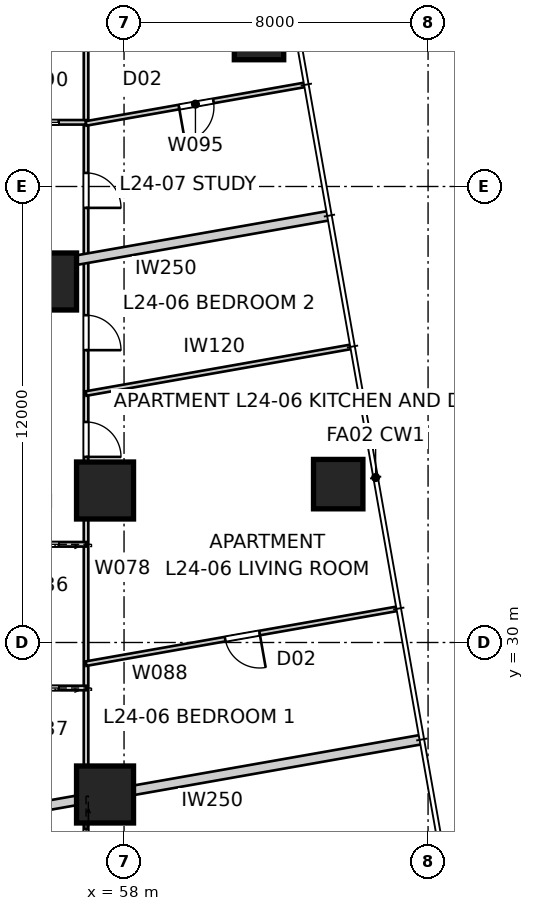
"""IFC4 building model, lengths in metres.
Left out: names, types, materials, properties, quantities, classifications, styles, units other than length and angle.
Written with IfcOpenShell. Run it as: python <this file> out.ifc"""

import sys

from ifc_helpers import new_model, si_unit, direction, frame, frame_2d, origin, origin_2d, place, context, subcontext, project, spatial, rectangle, extrude, element, fill, save


model = new_model("IFC4")
c1 = context("Model", 3, precision=1e-05, world=origin(), true_north=direction((0.0, 1.0)))
c2 = subcontext(c1, "Body", "Model", "MODEL_VIEW")
j1 = project(units=[si_unit("LENGTHUNIT", "METRE"), si_unit("PLANEANGLEUNIT", "RADIAN")], contexts=[c1])
p1 = place(None, origin())
s1 = spatial("IfcSite", under=j1, at=p1, CompositionType="ELEMENT")
p2 = place(p1, origin())
s2 = spatial("IfcBuilding", under=s1, at=p2, CompositionType="ELEMENT")
p3 = place(p2, frame((0.0, 0.0, 89.6)))
s3 = spatial("IfcBuildingStorey", under=s2, at=p3, CompositionType="ELEMENT", Elevation=89.6)
for number, where, z_axis, x_axis in (
    (1, (63.635, 34.167, 0.0), (0.0, 0.0, 1.0), (1.0, 0.0, 0.0)),
    (2, (61.552, 45.985, 0.0), (0.0, 0.0, 1.0), (1.0, 0.0, 0.0)),
):
    element("IfcColumn", number, at=place(p3, frame(where, z_axis=z_axis, x_axis=x_axis)), inside=s3, PredefinedType="COLUMN", context=c2, shape_type="SweptSolid", body=[
        extrude(rectangle(XDim=1.3, YDim=1.3, at=origin_2d()), origin(), (0.0, 0.0, 1.0), 3.4),
    ])
for number, where, z_axis, x_axis in (
    (3, (57.5, 26.0, 0.0), (0.0, 0.0, 1.0), (1.0, 0.0, 0.0)),
    (4, (57.5, 34.0, 0.0), (0.0, 0.0, 1.0), (1.0, 0.0, 0.0)),
    (5, (56.0, 39.5, 0.0), (0.0, 0.0, 1.0), (1.0, 0.0, 0.0)),
):
    element("IfcColumn", number, at=place(p3, frame(where, z_axis=z_axis, x_axis=x_axis)), inside=s3, PredefinedType="COLUMN", context=c2, shape_type="SweptSolid", body=[
        extrude(rectangle(XDim=1.5, YDim=1.5, at=origin_2d()), origin(), (0.0, 0.0, 1.0), 3.4),
    ])
p4 = place(p3, frame((63.405, 41.235, 0.0), z_axis=(0.0, 0.0, 1.0), x_axis=(-0.984806596137, -0.173654738504, 0.0)))
e6 = element("IfcWall", 6, at=p4, inside=s3, PredefinedType="PARTITIONING", context=c2, shape_type="SweptSolid", body=[
    extrude(rectangle(XDim=8.958, YDim=0.25, at=frame_2d((4.479, 0.0))), origin(), (0.0, 0.0, 1.0), 3.25),
])
p5 = place(p3, frame((65.836, 27.448, 0.0), z_axis=(0.0, 0.0, 1.0), x_axis=(-0.98481000304, -0.173635416642, 0.0)))
e7 = element("IfcWall", 7, at=p5, inside=s3, PredefinedType="PARTITIONING", context=c2, shape_type="SweptSolid", body=[
    extrude(rectangle(XDim=11.427, YDim=0.25, at=frame_2d((5.713, 0.0))), origin(), (0.0, 0.0, 1.0), 3.25),
])
p6 = place(p3, frame((57.0, 46.2, 0.0), z_axis=(0.0, 0.0, 1.0), x_axis=(0.0, -1.0, 0.0)))
e8 = element("IfcWall", 8, at=p6, inside=s3, PredefinedType="PARTITIONING", context=c2, shape_type="SweptSolid", body=[
    extrude(rectangle(XDim=32.4, YDim=0.12, at=frame_2d((16.2, 0.0))), origin(), (0.0, 0.0, 1.0), 2.55),
])
p7 = place(p6, frame((10.396, 0.0, 0.0)))
e9 = element("IfcOpeningElement", 9, at=p7, cuts=e8, PredefinedType="OPENING", context=c2, shape_type="SweptSolid", body=[
    extrude(rectangle(XDim=0.92, YDim=2.34, at=frame_2d((0.46, 1.17))), frame((0.0, 0.07, 0.0), z_axis=(0.0, -1.0, 0.0), x_axis=(1.0, 0.0, 0.0)), (0.0, 0.0, 1.0), 0.14),
])
p8 = place(p6, frame((7.587, 0.0, 0.0)))
e10 = element("IfcOpeningElement", 10, at=p8, cuts=e8, PredefinedType="OPENING", context=c2, shape_type="SweptSolid", body=[
    extrude(rectangle(XDim=0.92, YDim=2.34, at=frame_2d((0.46, 1.17))), frame((0.0, 0.07, 0.0), z_axis=(0.0, -1.0, 0.0), x_axis=(1.0, 0.0, 0.0)), (0.0, 0.0, 1.0), 0.14),
])
p9 = place(p6, frame((3.843, 0.0, 0.0)))
e11 = element("IfcOpeningElement", 11, at=p9, cuts=e8, PredefinedType="OPENING", context=c2, shape_type="SweptSolid", body=[
    extrude(rectangle(XDim=0.92, YDim=2.34, at=frame_2d((0.46, 1.17))), frame((0.0, 0.07, 0.0), z_axis=(0.0, -1.0, 0.0), x_axis=(1.0, 0.0, 0.0)), (0.0, 0.0, 1.0), 0.14),
])
p10 = place(p6, frame((27.988, 0.0, 0.0)))
e12 = element("IfcOpeningElement", 12, at=p10, cuts=e8, PredefinedType="OPENING", context=c2, shape_type="SweptSolid", body=[
    extrude(rectangle(XDim=0.92, YDim=2.34, at=frame_2d((0.46, 1.17))), frame((0.0, 0.07, 0.0), z_axis=(0.0, -1.0, 0.0), x_axis=(1.0, 0.0, 0.0)), (0.0, 0.0, 1.0), 0.14),
])
p11 = place(p6, frame((23.957, 0.0, 0.0)))
e13 = element("IfcOpeningElement", 13, at=p11, cuts=e8, PredefinedType="OPENING", context=c2, shape_type="SweptSolid", body=[
    extrude(rectangle(XDim=0.96, YDim=2.1, at=frame_2d((0.48, 1.05))), frame((0.0, 0.07, 0.0), z_axis=(0.0, -1.0, 0.0), x_axis=(1.0, 0.0, 0.0)), (0.0, 0.0, 1.0), 0.14),
])
p12 = place(p6, frame((21.108, 0.0, 0.0)))
e14 = element("IfcOpeningElement", 14, at=p12, cuts=e8, PredefinedType="OPENING", context=c2, shape_type="SweptSolid", body=[
    extrude(rectangle(XDim=0.96, YDim=2.1, at=frame_2d((0.48, 1.05))), frame((0.0, 0.07, 0.0), z_axis=(0.0, -1.0, 0.0), x_axis=(1.0, 0.0, 0.0)), (0.0, 0.0, 1.0), 0.14),
])
p13 = place(p3, frame((57.0, 32.585, 0.0), z_axis=(0.0, 0.0, 1.0), x_axis=(-1.0, 0.0, 0.0)))
e15 = element("IfcWall", 15, at=p13, inside=s3, PredefinedType="PARTITIONING", context=c2, shape_type="SweptSolid", body=[
    extrude(rectangle(XDim=2.4, YDim=0.12, at=frame_2d((1.2, 0.0))), origin(), (0.0, 0.0, 1.0), 3.25),
])
p14 = place(p13, frame((0.72, 0.0, 0.0)))
e16 = element("IfcOpeningElement", 16, at=p14, cuts=e15, PredefinedType="OPENING", context=c2, shape_type="SweptSolid", body=[
    extrude(rectangle(XDim=0.96, YDim=2.1, at=frame_2d((0.48, 1.05))), frame((0.0, 0.07, 0.0), z_axis=(0.0, -1.0, 0.0), x_axis=(1.0, 0.0, 0.0)), (0.0, 0.0, 1.0), 0.14),
])
p15 = place(p3, frame((57.0, 28.802, 0.0), z_axis=(0.0, 0.0, 1.0), x_axis=(-1.0, 0.0, 0.0)))
e17 = element("IfcWall", 17, at=p15, inside=s3, PredefinedType="PARTITIONING", context=c2, shape_type="SweptSolid", body=[
    extrude(rectangle(XDim=2.4, YDim=0.12, at=frame_2d((1.2, 0.0))), origin(), (0.0, 0.0, 1.0), 3.25),
])
p16 = place(p15, frame((0.72, 0.0, 0.0)))
e18 = element("IfcOpeningElement", 18, at=p16, cuts=e17, PredefinedType="OPENING", context=c2, shape_type="SweptSolid", body=[
    extrude(rectangle(XDim=0.96, YDim=2.1, at=frame_2d((0.48, 1.05))), frame((0.0, 0.07, 0.0), z_axis=(0.0, -1.0, 0.0), x_axis=(1.0, 0.0, 0.0)), (0.0, 0.0, 1.0), 0.14),
])
p17 = place(p3, frame((65.188, 30.887, 0.0), z_axis=(0.0, 0.0, 1.0), x_axis=(-0.984807787824, -0.173647980238, 0.0)))
e19 = element("IfcWall", 19, at=p17, inside=s3, PredefinedType="PARTITIONING", context=c2, shape_type="SweptSolid", body=[
    extrude(rectangle(XDim=8.315, YDim=0.12, at=frame_2d((4.157, 0.0))), origin(), (0.0, 0.0, 1.0), 3.25),
])
p18 = place(p17, frame((3.677, 0.0, 0.0)))
e20 = element("IfcOpeningElement", 20, at=p18, cuts=e19, PredefinedType="OPENING", context=c2, shape_type="SweptSolid", body=[
    extrude(rectangle(XDim=0.92, YDim=2.34, at=frame_2d((0.46, 1.17))), frame((0.0, 0.07, 0.0), z_axis=(0.0, -1.0, 0.0), x_axis=(1.0, 0.0, 0.0)), (0.0, 0.0, 1.0), 0.14),
])
p19 = place(p3, frame((57.0, 36.552, 0.0), z_axis=(0.0, 0.0, 1.0), x_axis=(0.984809234282, 0.173639776761, 0.0)))
e21 = element("IfcWall", 21, at=p19, inside=s3, PredefinedType="PARTITIONING", context=c2, shape_type="SweptSolid", body=[
    extrude(rectangle(XDim=7.081, YDim=0.12, at=frame_2d((3.541, 0.0))), origin(), (0.0, 0.0, 1.0), 3.25),
])
p20 = place(p3, frame((54.6, 43.689, 0.0), z_axis=(0.0, 0.0, 1.0), x_axis=(1.0, 0.0, 0.0)))
e22 = element("IfcWall", 22, at=p20, inside=s3, PredefinedType="PARTITIONING", context=c2, shape_type="SweptSolid", body=[
    extrude(rectangle(XDim=2.4, YDim=0.12, at=frame_2d((1.2, 0.0))), origin(), (0.0, 0.0, 1.0), 3.25),
])
p21 = place(p20, frame((0.72, 0.0, 0.0)))
e23 = element("IfcOpeningElement", 23, at=p21, cuts=e22, PredefinedType="OPENING", context=c2, shape_type="SweptSolid", body=[
    extrude(rectangle(XDim=0.96, YDim=2.1, at=frame_2d((0.48, 1.05))), frame((0.0, 0.07, 0.0), z_axis=(0.0, -1.0, 0.0), x_axis=(1.0, 0.0, 0.0)), (0.0, 0.0, 1.0), 0.14),
])
p22 = place(p3, frame((62.758, 44.675, 0.0), z_axis=(0.0, 0.0, 1.0), x_axis=(-0.984810032319, -0.173635250578, 0.0)))
e24 = element("IfcWall", 24, at=p22, inside=s3, PredefinedType="PARTITIONING", context=c2, shape_type="SweptSolid", body=[
    extrude(rectangle(XDim=5.846, YDim=0.12, at=frame_2d((2.923, 0.0))), origin(), (0.0, 0.0, 1.0), 3.25),
])
p23 = place(p22, frame((2.443, 0.0, 0.0)))
e25 = element("IfcOpeningElement", 25, at=p23, cuts=e24, PredefinedType="OPENING", context=c2, shape_type="SweptSolid", body=[
    extrude(rectangle(XDim=0.92, YDim=2.34, at=frame_2d((0.46, 1.17))), frame((0.0, 0.07, 0.0), z_axis=(0.0, -1.0, 0.0), x_axis=(1.0, 0.0, 0.0)), (0.0, 0.0, 1.0), 0.14),
])
p24 = place(p7, origin())
e26 = element("IfcDoor", 26, at=p24, inside=s3, OperationType="SINGLE_SWING_RIGHT", PredefinedType="DOOR", context=c2, shape_type="SweptSolid", body=[
    extrude(rectangle(XDim=0.92, YDim=2.34, at=frame_2d((0.46, 1.17))), frame((0.0, 0.025, 0.0), z_axis=(0.0, -1.0, 0.0), x_axis=(1.0, 0.0, 0.0)), (0.0, 0.0, 1.0), 0.05),
])
fill(e9, e26)
p25 = place(p8, origin())
e27 = element("IfcDoor", 27, at=p25, inside=s3, OperationType="SINGLE_SWING_RIGHT", PredefinedType="DOOR", context=c2, shape_type="SweptSolid", body=[
    extrude(rectangle(XDim=0.92, YDim=2.34, at=frame_2d((0.46, 1.17))), frame((0.0, 0.025, 0.0), z_axis=(0.0, -1.0, 0.0), x_axis=(1.0, 0.0, 0.0)), (0.0, 0.0, 1.0), 0.05),
])
fill(e10, e27)
p26 = place(p14, origin())
e28 = element("IfcDoor", 28, at=p26, inside=s3, OperationType="SLIDING_TO_LEFT", PredefinedType="DOOR", context=c2, shape_type="SweptSolid", body=[
    extrude(rectangle(XDim=0.96, YDim=2.1, at=frame_2d((0.48, 1.05))), frame((0.0, 0.025, 0.0), z_axis=(0.0, -1.0, 0.0), x_axis=(1.0, 0.0, 0.0)), (0.0, 0.0, 1.0), 0.05),
])
fill(e16, e28)
p27 = place(p9, origin())
e29 = element("IfcDoor", 29, at=p27, inside=s3, OperationType="SINGLE_SWING_RIGHT", PredefinedType="DOOR", context=c2, shape_type="SweptSolid", body=[
    extrude(rectangle(XDim=0.92, YDim=2.34, at=frame_2d((0.46, 1.17))), frame((0.0, 0.025, 0.0), z_axis=(0.0, -1.0, 0.0), x_axis=(1.0, 0.0, 0.0)), (0.0, 0.0, 1.0), 0.05),
])
fill(e11, e29)
p28 = place(p21, origin())
e30 = element("IfcDoor", 30, at=p28, inside=s3, OperationType="SLIDING_TO_LEFT", PredefinedType="DOOR", context=c2, shape_type="SweptSolid", body=[
    extrude(rectangle(XDim=0.96, YDim=2.1, at=frame_2d((0.48, 1.05))), frame((0.0, 0.025, 0.0), z_axis=(0.0, -1.0, 0.0), x_axis=(1.0, 0.0, 0.0)), (0.0, 0.0, 1.0), 0.05),
])
fill(e23, e30)
p29 = place(p18, origin())
e31 = element("IfcDoor", 31, at=p29, inside=s3, OperationType="SINGLE_SWING_LEFT", PredefinedType="DOOR", context=c2, shape_type="SweptSolid", body=[
    extrude(rectangle(XDim=0.92, YDim=2.34, at=frame_2d((0.46, 1.17))), frame((0.0, 0.025, 0.0), z_axis=(0.0, -1.0, 0.0), x_axis=(1.0, 0.0, 0.0)), (0.0, 0.0, 1.0), 0.05),
])
fill(e20, e31)
p30 = place(p16, origin())
e32 = element("IfcDoor", 32, at=p30, inside=s3, OperationType="SLIDING_TO_LEFT", PredefinedType="DOOR", context=c2, shape_type="SweptSolid", body=[
    extrude(rectangle(XDim=0.96, YDim=2.1, at=frame_2d((0.48, 1.05))), frame((0.0, 0.025, 0.0), z_axis=(0.0, -1.0, 0.0), x_axis=(1.0, 0.0, 0.0)), (0.0, 0.0, 1.0), 0.05),
])
fill(e18, e32)
p31 = place(p23, origin())
e33 = element("IfcDoor", 33, at=p31, inside=s3, OperationType="SINGLE_SWING_RIGHT", PredefinedType="DOOR", context=c2, shape_type="SweptSolid", body=[
    extrude(rectangle(XDim=0.92, YDim=2.34, at=frame_2d((0.46, 1.17))), frame((0.0, 0.025, 0.0), z_axis=(0.0, -1.0, 0.0), x_axis=(1.0, 0.0, 0.0)), (0.0, 0.0, 1.0), 0.05),
])
fill(e25, e33)
p32 = place(p12, origin())
e34 = element("IfcDoor", 34, at=p32, inside=s3, OperationType="SLIDING_TO_LEFT", PredefinedType="DOOR", context=c2, shape_type="SweptSolid", body=[
    extrude(rectangle(XDim=0.96, YDim=2.1, at=frame_2d((0.48, 1.05))), frame((0.0, 0.025, 0.0), z_axis=(0.0, -1.0, 0.0), x_axis=(1.0, 0.0, 0.0)), (0.0, 0.0, 1.0), 0.05),
])
fill(e14, e34)
save(model, sys.argv[1])
